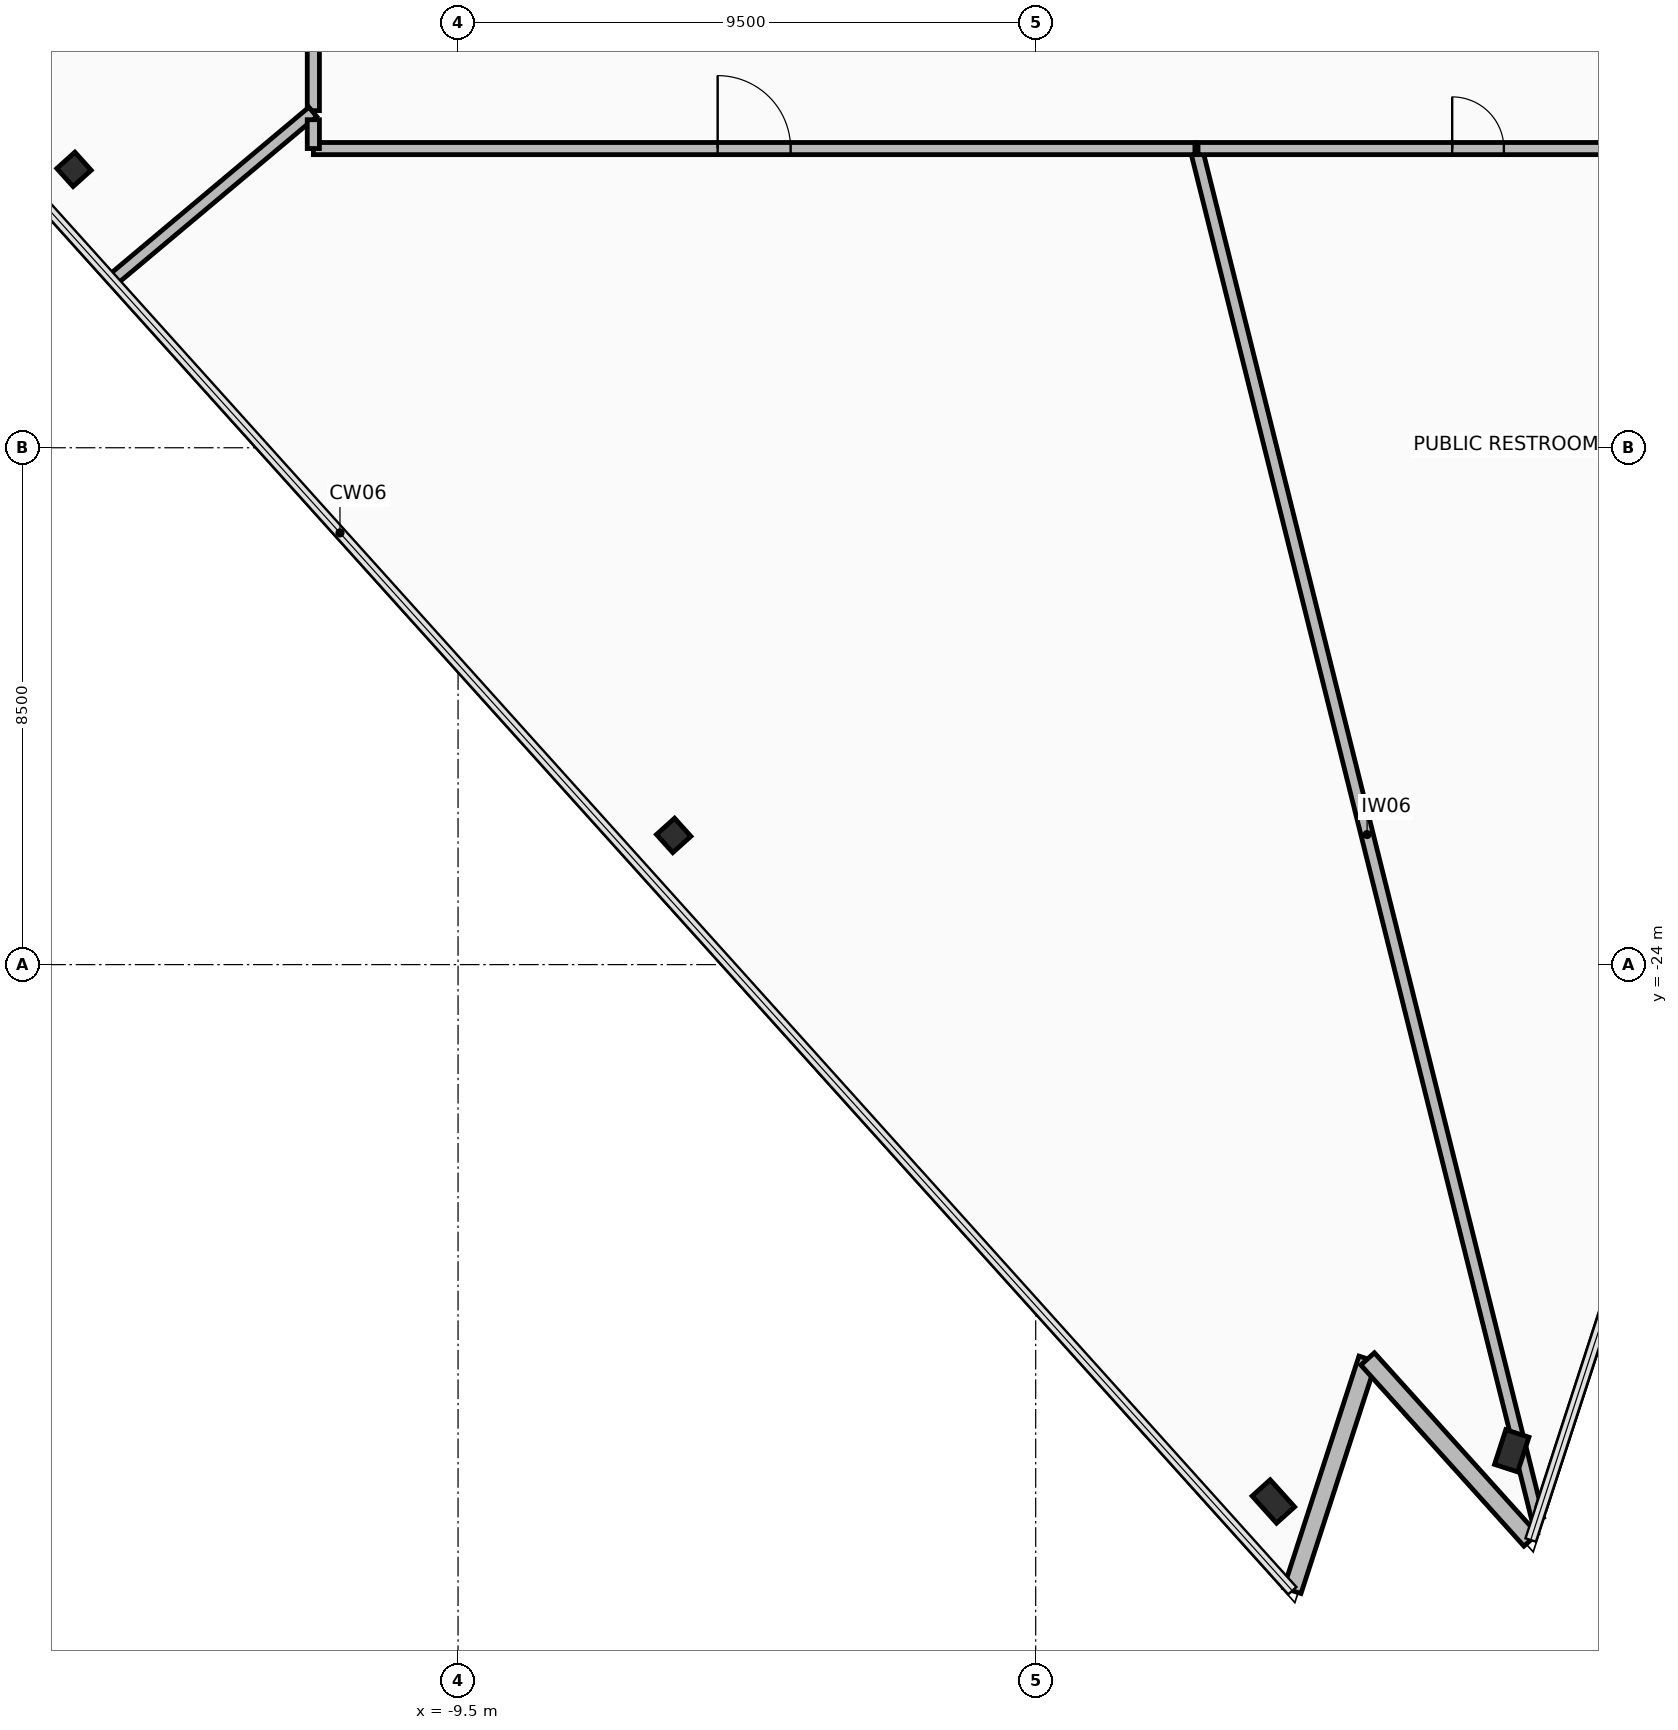
"""IFC4 building model, lengths in metres.
Left out: names, types, materials, properties, quantities, classifications, styles, units other than length and angle.
Written with IfcOpenShell. Run it as: python <this file> out.ifc"""

import sys

from ifc_helpers import new_model, si_unit, direction, frame, frame_2d, origin, origin_2d, place, context, subcontext, project, spatial, rectangle, hollow_rectangle, extrude, element, fill, save


model = new_model("IFC4")
c1 = context("Model", 3, precision=1e-05, world=origin(), true_north=direction((0.0, 1.0)))
c2 = subcontext(c1, "Body", "Model", "MODEL_VIEW")
j1 = project(units=[si_unit("LENGTHUNIT", "METRE"), si_unit("PLANEANGLEUNIT", "RADIAN")], contexts=[c1])
p1 = place(None, origin())
s1 = spatial("IfcSite", under=j1, at=p1, CompositionType="ELEMENT")
p2 = place(p1, origin())
s2 = spatial("IfcBuilding", under=s1, at=p2, CompositionType="ELEMENT")
p3 = place(p2, frame((0.0, 0.0, 283.4)))
s3 = spatial("IfcBuildingStorey", under=s2, at=p3, CompositionType="ELEMENT", Elevation=283.4)
for number, where, z_axis, x_axis in (
    (1, (-15.816, -10.922, 0.0), (0.0, 0.0, 1.0), (-0.669, 0.743, 0.0)),
    (2, (-5.954, -21.875, 0.0), (0.0, 0.0, 1.0), (-0.669, 0.743, 0.0)),
):
    element("IfcColumn", number, at=place(p3, frame(where, z_axis=z_axis, x_axis=x_axis)), inside=s3, PredefinedType="COLUMN", context=c2, shape_type="SweptSolid", body=[
        extrude(hollow_rectangle(XDim=0.4, YDim=0.4, WallThickness=0.025, at=origin_2d()), origin(), (0.0, 0.0, 1.0), 3.65),
    ])
for number, where, z_axis, x_axis in (
    (3, (3.909, -32.829, 0.0), (0.0, 0.0, 1.0), (-0.669, 0.743, 0.0)),
    (4, (7.829, -31.996, 0.0), (0.0, 0.0, 1.0), (0.309, 0.951, 0.0)),
):
    element("IfcColumn", number, at=place(p3, frame(where, z_axis=z_axis, x_axis=x_axis)), inside=s3, PredefinedType="COLUMN", context=c2, shape_type="SweptSolid", body=[
        extrude(hollow_rectangle(XDim=0.4, YDim=0.6, WallThickness=0.03, at=origin_2d()), origin(), (0.0, 0.0, 1.0), 3.65),
    ])
p4 = place(p3, frame((4.221, -34.296, 0.0), z_axis=(0.0, 0.0, 1.0), x_axis=(0.309018580232, 0.951056001018, 0.0)))
e5 = element("IfcWall", 5, at=p4, inside=s3, PredefinedType="STANDARD", context=c2, shape_type="SweptSolid", body=[
    extrude(rectangle(XDim=4.008, YDim=0.3, at=frame_2d((2.004, 0.0))), origin(), (0.0, 0.0, 1.0), 2.81),
])
p5 = place(p3, frame((5.459, -30.484, 0.0), z_axis=(0.0, 0.0, 1.0), x_axis=(0.669132983361, -0.743142685208, 0.0)))
e6 = element("IfcWall", 6, at=p5, inside=s3, PredefinedType="STANDARD", context=c2, shape_type="SweptSolid", body=[
    extrude(rectangle(XDim=4.008, YDim=0.3, at=frame_2d((2.004, 0.0))), origin(), (0.0, 0.0, 1.0), 2.81),
])
p6 = place(p3, frame((8.256, -33.111, 0.0), z_axis=(0.0, 0.0, 1.0), x_axis=(-0.241931126379, 0.970293424738, 0.0)))
e7 = element("IfcWall", 7, at=p6, inside=s3, PredefinedType="PARTITIONING", context=c2, shape_type="SweptSolid", body=[
    extrude(rectangle(XDim=23.189, YDim=0.2, at=frame_2d((11.594, 0.0))), origin(), (0.0, 0.0, 1.0), 2.81),
])
p7 = place(p3, frame((2.67, -10.58, 0.0), z_axis=(0.0, 0.0, 1.0), x_axis=(1.0, 0.0, 0.0)))
e8 = element("IfcWall", 8, at=p7, inside=s3, PredefinedType="PARTITIONING", context=c2, shape_type="SweptSolid", body=[
    extrude(rectangle(XDim=9.209, YDim=0.2, at=frame_2d((4.605, 0.0))), origin(), (0.0, 0.0, 1.0), 2.96),
])
p8 = place(p7, frame((4.18, 0.0, 0.0)))
e9 = element("IfcOpeningElement", 9, at=p8, cuts=e8, PredefinedType="OPENING", context=c2, shape_type="SweptSolid", body=[
    extrude(rectangle(XDim=0.85, YDim=2.1, at=frame_2d((0.425, 1.05))), frame((0.0, 0.11, 0.0), z_axis=(0.0, -1.0, 0.0), x_axis=(1.0, 0.0, 0.0)), (0.0, 0.0, 1.0), 0.22),
])
p9 = place(p3, frame((17.777, -3.807, 0.0), z_axis=(0.0, 0.0, 1.0), x_axis=(-0.309024581215, -0.951054051148, 0.0)))
e10 = element("IfcWall", 10, at=p9, inside=s3, PredefinedType="PARTITIONING", context=c2, shape_type="SweptSolid", body=[
    extrude(rectangle(XDim=30.614, YDim=0.15, at=frame_2d((15.307, 0.0))), origin(), (0.0, 0.0, 1.0), 3.465),
])
p10 = place(p3, frame((-11.88, -1.925, 0.0), z_axis=(0.0, 0.0, 1.0), x_axis=(0.0, -1.0, 0.0)))
e11 = element("IfcWall", 11, at=p10, inside=s3, PredefinedType="PARTITIONING", context=c2, shape_type="SweptSolid", body=[
    extrude(rectangle(XDim=8.032, YDim=0.2, at=frame_2d((4.016, 0.0))), origin(), (0.0, 0.0, 1.0), 2.96),
])
p11 = place(p3, frame((-11.889, -9.976, 0.0), z_axis=(0.0, 0.0, 1.0), x_axis=(-0.766051997516, -0.642778606599, 0.0)))
e12 = element("IfcWall", 12, at=p11, inside=s3, PredefinedType="PARTITIONING", context=c2, shape_type="SweptSolid", body=[
    extrude(rectangle(XDim=4.28, YDim=0.2, at=frame_2d((2.14, 0.0))), origin(), (0.0, 0.0, 1.0), 2.81),
])
p12 = place(p3, frame((-11.879, -10.58, 0.0), z_axis=(0.0, 0.0, 1.0), x_axis=(1.0, 0.0, 0.0)))
e13 = element("IfcWall", 13, at=p12, inside=s3, PredefinedType="PARTITIONING", context=c2, shape_type="SweptSolid", body=[
    extrude(rectangle(XDim=14.498, YDim=0.2, at=frame_2d((7.249, 0.0))), origin(), (0.0, 0.0, 1.0), 2.96),
])
p13 = place(p12, frame((6.649, 0.0, 0.0)))
e14 = element("IfcOpeningElement", 14, at=p13, cuts=e13, PredefinedType="OPENING", context=c2, shape_type="SweptSolid", body=[
    extrude(rectangle(XDim=1.2, YDim=2.15, at=frame_2d((0.6, 1.075))), frame((0.0, 0.11, 0.0), z_axis=(0.0, -1.0, 0.0), x_axis=(1.0, 0.0, 0.0)), (0.0, 0.0, 1.0), 0.22),
])
p14 = place(p3, frame((-11.88, -10.106, 0.0), z_axis=(0.0, 0.0, 1.0), x_axis=(0.0, -1.0, 0.0)))
e15 = element("IfcWall", 15, at=p14, inside=s3, PredefinedType="PARTITIONING", context=c2, shape_type="SweptSolid", body=[
    extrude(rectangle(XDim=0.474, YDim=0.2, at=frame_2d((0.237, 0.0))), origin(), (0.0, 0.0, 1.0), 3.22),
])
p15 = place(p8, origin())
e16 = element("IfcDoor", 16, at=p15, inside=s3, OperationType="SINGLE_SWING_RIGHT", PredefinedType="DOOR", context=c2, shape_type="SweptSolid", body=[
    extrude(rectangle(XDim=0.85, YDim=2.1, at=frame_2d((0.425, 1.05))), frame((0.0, 0.025, 0.0), z_axis=(0.0, -1.0, 0.0), x_axis=(1.0, 0.0, 0.0)), (0.0, 0.0, 1.0), 0.05),
])
fill(e9, e16)
p16 = place(p13, origin())
e17 = element("IfcDoor", 17, at=p16, inside=s3, OperationType="SINGLE_SWING_LEFT", PredefinedType="DOOR", context=c2, shape_type="SweptSolid", body=[
    extrude(rectangle(XDim=1.2, YDim=2.15, at=frame_2d((0.6, 1.075))), frame((0.0, 0.025, 0.0), z_axis=(0.0, -1.0, 0.0), x_axis=(1.0, 0.0, 0.0)), (0.0, 0.0, 1.0), 0.05),
])
fill(e14, e17)
save(model, sys.argv[1])
